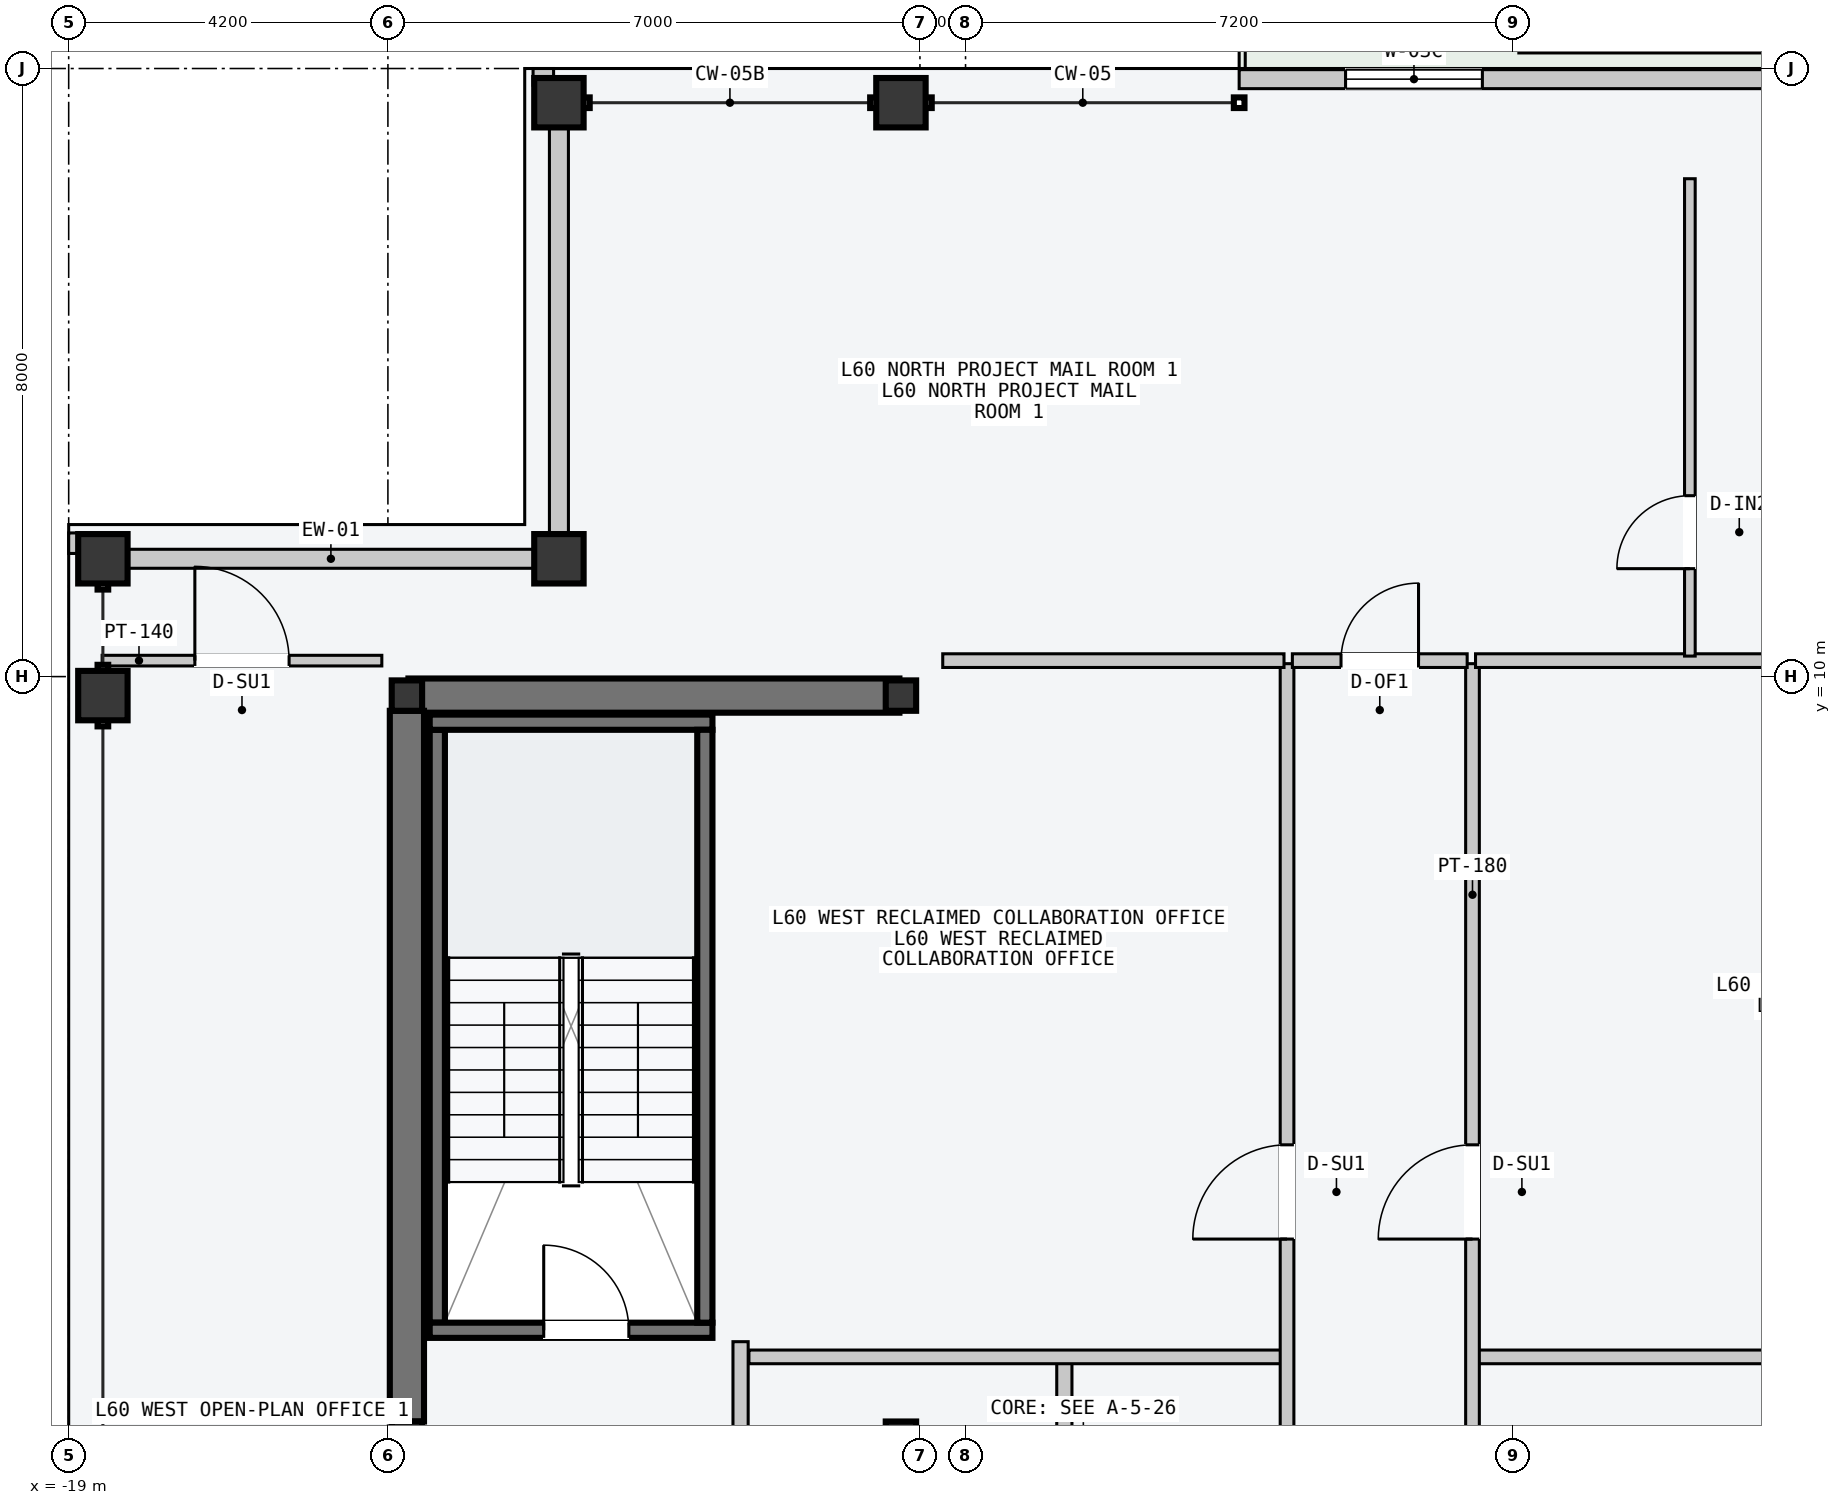
"""IFC4 building model, lengths in metres.
Left out: names, types, materials, properties, quantities, classifications, styles, units other than length and angle.
Written with IfcOpenShell. Run it as: python <this file> out.ifc"""

import sys

from ifc_helpers import new_model, si_unit, direction, frame, frame_2d, origin, origin_2d, place, context, subcontext, project, spatial, rectangle, hollow_rectangle, i_section, extrude, element, fill, save


model = new_model("IFC4")
c1 = context("Model", 3, precision=1e-05, world=origin(), true_north=direction((0.0, 1.0)))
c2 = subcontext(c1, "Body", "Model", "MODEL_VIEW")
j1 = project(units=[si_unit("LENGTHUNIT", "METRE"), si_unit("PLANEANGLEUNIT", "RADIAN")], contexts=[c1])
p1 = place(None, origin())
s1 = spatial("IfcSite", under=j1, at=p1, CompositionType="ELEMENT")
p2 = place(p1, origin())
s2 = spatial("IfcBuilding", under=s1, at=p2, CompositionType="ELEMENT")
p3 = place(p2, frame((0.0, 0.0, 229.2)))
s3 = spatial("IfcBuildingStorey", under=s2, at=p3, CompositionType="ELEMENT", Elevation=229.2)
p4 = place(p3, frame((-14.53, 9.75, -0.2), z_axis=(0.0, 0.0, 1.0), x_axis=(1.0, 0.0, 0.0)))
e1 = element("IfcWall", 1, at=p4, inside=s3, PredefinedType="SHEAR", context=c2, shape_type="SweptSolid", body=[
    extrude(rectangle(XDim=6.46, YDim=0.45, at=frame_2d((3.23, 0.0))), origin(), (0.0, 0.0, 1.0), 3.6),
])
p5 = place(p3, frame((-14.55, 0.2, -0.2), z_axis=(0.0, 0.0, 1.0), x_axis=(0.0, 1.0, 0.0)))
e2 = element("IfcWall", 2, at=p5, inside=s3, PredefinedType="SHEAR", context=c2, shape_type="SweptSolid", body=[
    extrude(rectangle(XDim=9.35, YDim=0.45, at=frame_2d((4.675, 0.0))), origin(), (0.0, 0.0, 1.0), 3.6),
])
p6 = place(p3, frame((-14.15, 1.5, -0.2), z_axis=(0.0, 0.0, 1.0), x_axis=(0.0, 1.0, 0.0)))
e3 = element("IfcWall", 3, at=p6, inside=s3, PredefinedType="SOLIDWALL", context=c2, shape_type="SweptSolid", body=[
    extrude(rectangle(XDim=7.8, YDim=0.2, at=frame_2d((3.9, 0.0))), origin(), (0.0, 0.0, 1.0), 3.6),
])
p7 = place(p3, frame((-14.25, 1.4, -0.2), z_axis=(0.0, 0.0, 1.0), x_axis=(1.0, 0.0, 0.0)))
e4 = element("IfcWall", 4, at=p7, inside=s3, PredefinedType="SOLIDWALL", context=c2, shape_type="SweptSolid", body=[
    extrude(rectangle(XDim=3.72, YDim=0.2, at=frame_2d((1.86, 0.0))), origin(), (0.0, 0.0, 1.0), 3.6),
])
p8 = place(p7, frame((1.5, 0.0, 0.2)))
e5 = element("IfcOpeningElement", 5, at=p8, cuts=e4, PredefinedType="OPENING", context=c2, shape_type="SweptSolid", body=[
    extrude(rectangle(XDim=1.12, YDim=2.18, at=frame_2d((0.56, 1.09))), frame((0.0, 0.11, 0.0), z_axis=(0.0, -1.0, 0.0), x_axis=(1.0, 0.0, 0.0)), (0.0, 0.0, 1.0), 0.22),
])
p9 = place(p3, frame((-14.25, 9.4, -0.2), z_axis=(0.0, 0.0, 1.0), x_axis=(1.0, 0.0, 0.0)))
e6 = element("IfcWall", 6, at=p9, inside=s3, PredefinedType="SOLIDWALL", context=c2, shape_type="SweptSolid", body=[
    extrude(rectangle(XDim=3.72, YDim=0.2, at=frame_2d((1.86, 0.0))), origin(), (0.0, 0.0, 1.0), 3.6),
])
p10 = place(p3, frame((-10.63, 1.5, -0.2), z_axis=(0.0, 0.0, 1.0), x_axis=(0.0, 1.0, 0.0)))
e7 = element("IfcWall", 7, at=p10, inside=s3, PredefinedType="SOLIDWALL", context=c2, shape_type="SweptSolid", body=[
    extrude(rectangle(XDim=7.8, YDim=0.2, at=frame_2d((3.9, 0.0))), origin(), (0.0, 0.0, 1.0), 3.6),
])
for number, where, z_axis, x_axis in (
    (8, (-14.55, 0.0, 0.0), (0.0, 0.0, 1.0), (1.0, 0.0, 0.0)),
    (9, (-14.55, 9.75, 0.0), (0.0, 0.0, 1.0), (1.0, 0.0, 0.0)),
    (10, (-8.05, 0.0, 0.0), (0.0, 0.0, 1.0), (1.0, 0.0, 0.0)),
    (11, (-8.05, 9.75, 0.0), (0.0, 0.0, 1.0), (1.0, 0.0, 0.0)),
):
    element("IfcColumn", number, at=place(p3, frame(where, z_axis=z_axis, x_axis=x_axis)), inside=s3, PredefinedType="COLUMN", context=c2, shape_type="SweptSolid", body=[
        extrude(i_section(OverallWidth=0.4, OverallDepth=0.4, WebThickness=0.013, FlangeThickness=0.021, at=origin_2d()), origin(), (0.0, 0.0, 1.0), 3.6),
    ])
for number, where, z_axis, x_axis in (
    (12, (-12.55, 17.55, 0.0), (0.0, 0.0, 1.0), (1.0, 0.0, 0.0)),
    (13, (-8.05, 17.55, 0.0), (0.0, 0.0, 1.0), (1.0, 0.0, 0.0)),
    (14, (-18.55, 9.75, 0.0), (0.0, 0.0, 1.0), (0.0, 1.0, 0.0)),
    (15, (-18.55, 11.55, 0.0), (0.0, 0.0, 1.0), (0.0, 1.0, 0.0)),
    (16, (-12.55, 11.55, 0.0), (0.0, 0.0, 1.0), (1.0, 0.0, 0.0)),
):
    element("IfcColumn", number, at=place(p3, frame(where, z_axis=z_axis, x_axis=x_axis)), inside=s3, PredefinedType="COLUMN", context=c2, shape_type="SweptSolid", body=[
        extrude(hollow_rectangle(XDim=0.65, YDim=0.65, WallThickness=0.028, at=origin_2d()), origin(), (0.0, 0.0, 1.0), 3.6),
    ])
p11 = place(p3, frame((-3.6, 17.86, 0.0), z_axis=(0.0, 0.0, 1.0), x_axis=(1.0, 0.0, 0.0)))
e17 = element("IfcWall", 17, at=p11, inside=s3, PredefinedType="STANDARD", context=c2, shape_type="SweptSolid", body=[
    extrude(rectangle(XDim=10.8, YDim=0.25, at=frame_2d((5.4, 0.0))), origin(), (0.0, 0.0, 1.0), 3.4),
])
p12 = place(p11, frame((7.4, 0.0, 0.0)))
e18 = element("IfcOpeningElement", 18, at=p12, cuts=e17, PredefinedType="OPENING", context=c2, shape_type="SweptSolid", body=[
    extrude(rectangle(XDim=1.6, YDim=2.2, at=frame_2d((0.8, 1.1))), frame((0.0, 0.135, 0.0), z_axis=(0.0, -1.0, 0.0), x_axis=(1.0, 0.0, 0.0)), (0.0, 0.0, 1.0), 0.27),
])
p13 = place(p11, frame((1.4, 0.0, 0.85)))
e19 = element("IfcOpeningElement", 19, at=p13, cuts=e17, PredefinedType="OPENING", context=c2, shape_type="SweptSolid", body=[
    extrude(rectangle(XDim=1.8, YDim=2.05, at=frame_2d((0.9, 1.025))), frame((0.0, 0.135, 0.0), z_axis=(0.0, -1.0, 0.0), x_axis=(1.0, 0.0, 0.0)), (0.0, 0.0, 1.0), 0.27),
])
for number, where, z_axis, x_axis in (
    (20, (-18.215, 11.55, 0.0), (0.0, 0.0, 1.0), (1.0, 0.0, 0.0)),
    (21, (-12.55, 11.885, 0.0), (0.0, 0.0, 1.0), (0.0, 1.0, 0.0)),
):
    element("IfcWall", number, at=place(p3, frame(where, z_axis=z_axis, x_axis=x_axis)), inside=s3, PredefinedType="STANDARD", context=c2, shape_type="SweptSolid", body=[
        extrude(rectangle(XDim=5.33, YDim=0.25, at=frame_2d((2.665, 0.0))), origin(), (0.0, 0.0, 1.0), 2.85),
    ])
for number, where, z_axis, x_axis in (
    (22, (-12.89, 17.89, 0.0), (0.0, 0.0, 1.0), (1.0, 0.0, 0.0)),
    (23, (-18.89, 11.62, 0.0), (0.0, 0.0, 1.0), (0.0, 1.0, 0.0)),
):
    element("IfcWall", number, at=place(p3, frame(where, z_axis=z_axis, x_axis=x_axis)), inside=s3, PredefinedType="PARAPET", context=c2, shape_type="SweptSolid", body=[
        extrude(rectangle(XDim=0.27, YDim=0.22, at=frame_2d((0.135, 0.0))), origin(), (0.0, 0.0, 1.0), 1.2),
    ])
p14 = place(p3, frame((-5.9, -9.45, 0.0), z_axis=(0.0, 0.0, 1.0), x_axis=(0.0, 1.0, 0.0)))
e24 = element("IfcWall", 24, at=p14, inside=s3, PredefinedType="PARTITIONING", context=c2, shape_type="SweptSolid", body=[
    extrude(rectangle(XDim=10.5, YDim=0.2, at=frame_2d((5.25, 0.0))), origin(), (0.0, 0.0, 1.0), 3.4),
])
p15 = place(p14, frame((3.9, 0.0, 0.0)))
e25 = element("IfcOpeningElement", 25, at=p15, cuts=e24, PredefinedType="OPENING", context=c2, shape_type="SweptSolid", body=[
    extrude(rectangle(XDim=1.5, YDim=2.2, at=frame_2d((0.75, 1.1))), frame((0.0, 0.11, 0.0), z_axis=(0.0, -1.0, 0.0), x_axis=(1.0, 0.0, 0.0)), (0.0, 0.0, 1.0), 0.22),
])
p16 = place(p3, frame((-10.16, -2.55, 0.0), z_axis=(0.0, 0.0, 1.0), x_axis=(0.0, 1.0, 0.0)))
e26 = element("IfcWall", 26, at=p16, inside=s3, PredefinedType="PARTITIONING", context=c2, shape_type="SweptSolid", body=[
    extrude(rectangle(XDim=3.8, YDim=0.2, at=frame_2d((1.9, 0.0))), origin(), (0.0, 0.0, 1.0), 3.4),
])
p17 = place(p16, frame((1.3, 0.0, 0.0)))
e27 = element("IfcOpeningElement", 27, at=p17, cuts=e26, PredefinedType="OPENING", context=c2, shape_type="SweptSolid", body=[
    extrude(rectangle(XDim=1.1, YDim=2.15, at=frame_2d((0.55, 1.075))), frame((0.0, 0.11, 0.0), z_axis=(0.0, -1.0, 0.0), x_axis=(1.0, 0.0, 0.0)), (0.0, 0.0, 1.0), 0.22),
])
p18 = place(p3, frame((-10.05, 1.05, 0.0), z_axis=(0.0, 0.0, 1.0), x_axis=(1.0, 0.0, 0.0)))
e28 = element("IfcWall", 28, at=p18, inside=s3, PredefinedType="PARTITIONING", context=c2, shape_type="SweptSolid", body=[
    extrude(rectangle(XDim=7.04, YDim=0.18, at=frame_2d((3.52, 0.0))), origin(), (0.0, 0.0, 1.0), 3.4),
])
p19 = place(p3, frame((-2.97, -3.5, 0.0), z_axis=(0.0, 0.0, 1.0), x_axis=(0.0, 1.0, 0.0)))
e29 = element("IfcWall", 29, at=p19, inside=s3, PredefinedType="PARTITIONING", context=c2, shape_type="SweptSolid", body=[
    extrude(rectangle(XDim=13.67, YDim=0.18, at=frame_2d((6.835, 0.0))), origin(), (0.0, 0.0, 1.0), 3.4),
])
p20 = place(p19, frame((6.1, 0.0, 0.0)))
e30 = element("IfcOpeningElement", 30, at=p20, cuts=e29, PredefinedType="OPENING", context=c2, shape_type="SweptSolid", body=[
    extrude(rectangle(XDim=1.24, YDim=2.24, at=frame_2d((0.62, 1.12))), frame((0.0, 0.1, 0.0), z_axis=(0.0, -1.0, 0.0), x_axis=(1.0, 0.0, 0.0)), (0.0, 0.0, 1.0), 0.2),
])
p21 = place(p19, frame((1.6, 0.0, 0.0)))
e31 = element("IfcOpeningElement", 31, at=p21, cuts=e29, PredefinedType="OPENING", context=c2, shape_type="SweptSolid", body=[
    extrude(rectangle(XDim=0.96, YDim=2.18, at=frame_2d((0.48, 1.09))), frame((0.0, 0.1, 0.0), z_axis=(0.0, -1.0, 0.0), x_axis=(1.0, 0.0, 0.0)), (0.0, 0.0, 1.0), 0.2),
])
p22 = place(p3, frame((-7.5, 10.21, 0.0), z_axis=(0.0, 0.0, 1.0), x_axis=(1.0, 0.0, 0.0)))
e32 = element("IfcWall", 32, at=p22, inside=s3, PredefinedType="PARTITIONING", context=c2, shape_type="SweptSolid", body=[
    extrude(rectangle(XDim=4.49, YDim=0.18, at=frame_2d((2.245, 0.0))), origin(), (0.0, 0.0, 1.0), 3.4),
])
p23 = place(p3, frame((-0.49, 1.05, 0.0), z_axis=(0.0, 0.0, 1.0), x_axis=(1.0, 0.0, 0.0)))
e33 = element("IfcWall", 33, at=p23, inside=s3, PredefinedType="PARTITIONING", context=c2, shape_type="SweptSolid", body=[
    extrude(rectangle(XDim=10.55, YDim=0.18, at=frame_2d((5.275, 0.0))), origin(), (0.0, 0.0, 1.0), 3.4),
])
p24 = place(p3, frame((-0.53, -3.5, 0.0), z_axis=(0.0, 0.0, 1.0), x_axis=(0.0, 1.0, 0.0)))
e34 = element("IfcWall", 34, at=p24, inside=s3, PredefinedType="PARTITIONING", context=c2, shape_type="SweptSolid", body=[
    extrude(rectangle(XDim=13.67, YDim=0.18, at=frame_2d((6.835, 0.0))), origin(), (0.0, 0.0, 1.0), 3.4),
])
p25 = place(p24, frame((6.1, 0.0, 0.0)))
e35 = element("IfcOpeningElement", 35, at=p25, cuts=e34, PredefinedType="OPENING", context=c2, shape_type="SweptSolid", body=[
    extrude(rectangle(XDim=1.24, YDim=2.24, at=frame_2d((0.62, 1.12))), frame((0.0, 0.1, 0.0), z_axis=(0.0, -1.0, 0.0), x_axis=(1.0, 0.0, 0.0)), (0.0, 0.0, 1.0), 0.2),
])
p26 = place(p24, frame((1.6, 0.0, 0.0)))
e36 = element("IfcOpeningElement", 36, at=p26, cuts=e34, PredefinedType="OPENING", context=c2, shape_type="SweptSolid", body=[
    extrude(rectangle(XDim=0.96, YDim=2.18, at=frame_2d((0.48, 1.09))), frame((0.0, 0.1, 0.0), z_axis=(0.0, -1.0, 0.0), x_axis=(1.0, 0.0, 0.0)), (0.0, 0.0, 1.0), 0.2),
])
p27 = place(p3, frame((-0.49, 10.21, 0.0), z_axis=(0.0, 0.0, 1.0), x_axis=(1.0, 0.0, 0.0)))
e37 = element("IfcWall", 37, at=p27, inside=s3, PredefinedType="PARTITIONING", context=c2, shape_type="SweptSolid", body=[
    extrude(rectangle(XDim=7.99, YDim=0.18, at=frame_2d((3.995, 0.0))), origin(), (0.0, 0.0, 1.0), 3.4),
])
p28 = place(p3, frame((2.33, 10.27, 0.0), z_axis=(0.0, 0.0, 1.0), x_axis=(0.0, 1.0, 0.0)))
e38 = element("IfcWall", 38, at=p28, inside=s3, PredefinedType="PARTITIONING", context=c2, shape_type="SweptSolid", body=[
    extrude(rectangle(XDim=6.28, YDim=0.14, at=frame_2d((3.14, 0.0))), origin(), (0.0, 0.0, 1.0), 3.4),
])
p29 = place(p28, frame((1.15, 0.0, 0.0)))
e39 = element("IfcOpeningElement", 39, at=p29, cuts=e38, PredefinedType="OPENING", context=c2, shape_type="SweptSolid", body=[
    extrude(rectangle(XDim=0.96, YDim=2.18, at=frame_2d((0.48, 1.09))), frame((0.0, 0.08, 0.0), z_axis=(0.0, -1.0, 0.0), x_axis=(1.0, 0.0, 0.0)), (0.0, 0.0, 1.0), 0.16),
])
p30 = place(p3, frame((-2.9, 10.21, 0.0), z_axis=(0.0, 0.0, 1.0), x_axis=(1.0, 0.0, 0.0)))
e40 = element("IfcWall", 40, at=p30, inside=s3, PredefinedType="PARTITIONING", context=c2, shape_type="SweptSolid", body=[
    extrude(rectangle(XDim=2.3, YDim=0.18, at=frame_2d((1.15, 0.0))), origin(), (0.0, 0.0, 1.0), 3.4),
])
p31 = place(p30, frame((0.64, 0.0, 0.0)))
e41 = element("IfcOpeningElement", 41, at=p31, cuts=e40, PredefinedType="OPENING", context=c2, shape_type="SweptSolid", body=[
    extrude(rectangle(XDim=1.02, YDim=2.2, at=frame_2d((0.51, 1.1))), frame((0.0, 0.1, 0.0), z_axis=(0.0, -1.0, 0.0), x_axis=(1.0, 0.0, 0.0)), (0.0, 0.0, 1.0), 0.2),
])
p32 = place(p3, frame((-18.56, 10.21, 0.0), z_axis=(0.0, 0.0, 1.0), x_axis=(1.0, 0.0, 0.0)))
e42 = element("IfcWall", 42, at=p32, inside=s3, PredefinedType="PARTITIONING", context=c2, shape_type="SweptSolid", body=[
    extrude(rectangle(XDim=3.68, YDim=0.14, at=frame_2d((1.84, 0.0))), origin(), (0.0, 0.0, 1.0), 3.4),
])
p33 = place(p32, frame((1.22, 0.0, 0.0)))
e43 = element("IfcOpeningElement", 43, at=p33, cuts=e42, PredefinedType="OPENING", context=c2, shape_type="SweptSolid", body=[
    extrude(rectangle(XDim=1.24, YDim=2.24, at=frame_2d((0.62, 1.12))), frame((0.0, 0.08, 0.0), z_axis=(0.0, -1.0, 0.0), x_axis=(1.0, 0.0, 0.0)), (0.0, 0.0, 1.0), 0.16),
])
p34 = place(p8, origin())
e44 = element("IfcDoor", 44, at=p34, inside=s3, OperationType="SINGLE_SWING_LEFT", PredefinedType="DOOR", context=c2, shape_type="SweptSolid", body=[
    extrude(rectangle(XDim=1.12, YDim=2.18, at=frame_2d((0.56, 1.09))), frame((0.0, 0.025, 0.0), z_axis=(0.0, -1.0, 0.0), x_axis=(1.0, 0.0, 0.0)), (0.0, 0.0, 1.0), 0.05),
])
fill(e5, e44)
p35 = place(p13, origin())
e45 = element("IfcWindow", 45, at=p35, inside=s3, PartitioningType="SINGLE_PANEL", PredefinedType="WINDOW", context=c2, shape_type="SweptSolid", body=[
    extrude(rectangle(XDim=1.8, YDim=2.05, at=frame_2d((0.9, 1.025))), frame((0.0, 0.03, 0.0), z_axis=(0.0, -1.0, 0.0), x_axis=(1.0, 0.0, 0.0)), (0.0, 0.0, 1.0), 0.06),
])
fill(e19, e45)
p36 = place(p20, origin())
e46 = element("IfcDoor", 46, at=p36, inside=s3, OperationType="SINGLE_SWING_LEFT", PredefinedType="DOOR", context=c2, shape_type="SweptSolid", body=[
    extrude(rectangle(XDim=1.24, YDim=2.24, at=frame_2d((0.62, 1.12))), frame((0.0, 0.025, 0.0), z_axis=(0.0, -1.0, 0.0), x_axis=(1.0, 0.0, 0.0)), (0.0, 0.0, 1.0), 0.05),
])
fill(e30, e46)
p37 = place(p25, origin())
e47 = element("IfcDoor", 47, at=p37, inside=s3, OperationType="SINGLE_SWING_LEFT", PredefinedType="DOOR", context=c2, shape_type="SweptSolid", body=[
    extrude(rectangle(XDim=1.24, YDim=2.24, at=frame_2d((0.62, 1.12))), frame((0.0, 0.025, 0.0), z_axis=(0.0, -1.0, 0.0), x_axis=(1.0, 0.0, 0.0)), (0.0, 0.0, 1.0), 0.05),
])
fill(e35, e47)
p38 = place(p29, origin())
e48 = element("IfcDoor", 48, at=p38, inside=s3, OperationType="SINGLE_SWING_LEFT", PredefinedType="DOOR", context=c2, shape_type="SweptSolid", body=[
    extrude(rectangle(XDim=0.96, YDim=2.18, at=frame_2d((0.48, 1.09))), frame((0.0, 0.025, 0.0), z_axis=(0.0, -1.0, 0.0), x_axis=(1.0, 0.0, 0.0)), (0.0, 0.0, 1.0), 0.05),
])
fill(e39, e48)
p39 = place(p31, origin())
e49 = element("IfcDoor", 49, at=p39, inside=s3, OperationType="SINGLE_SWING_RIGHT", PredefinedType="DOOR", context=c2, shape_type="SweptSolid", body=[
    extrude(rectangle(XDim=1.02, YDim=2.2, at=frame_2d((0.51, 1.1))), frame((0.0, 0.025, 0.0), z_axis=(0.0, -1.0, 0.0), x_axis=(1.0, 0.0, 0.0)), (0.0, 0.0, 1.0), 0.05),
])
fill(e41, e49)
p40 = place(p33, origin())
e50 = element("IfcDoor", 50, at=p40, inside=s3, OperationType="SINGLE_SWING_LEFT", PredefinedType="DOOR", context=c2, shape_type="SweptSolid", body=[
    extrude(rectangle(XDim=1.24, YDim=2.24, at=frame_2d((0.62, 1.12))), frame((0.0, 0.025, 0.0), z_axis=(0.0, -1.0, 0.0), x_axis=(1.0, 0.0, 0.0)), (0.0, 0.0, 1.0), 0.05),
])
fill(e43, e50)
save(model, sys.argv[1])
